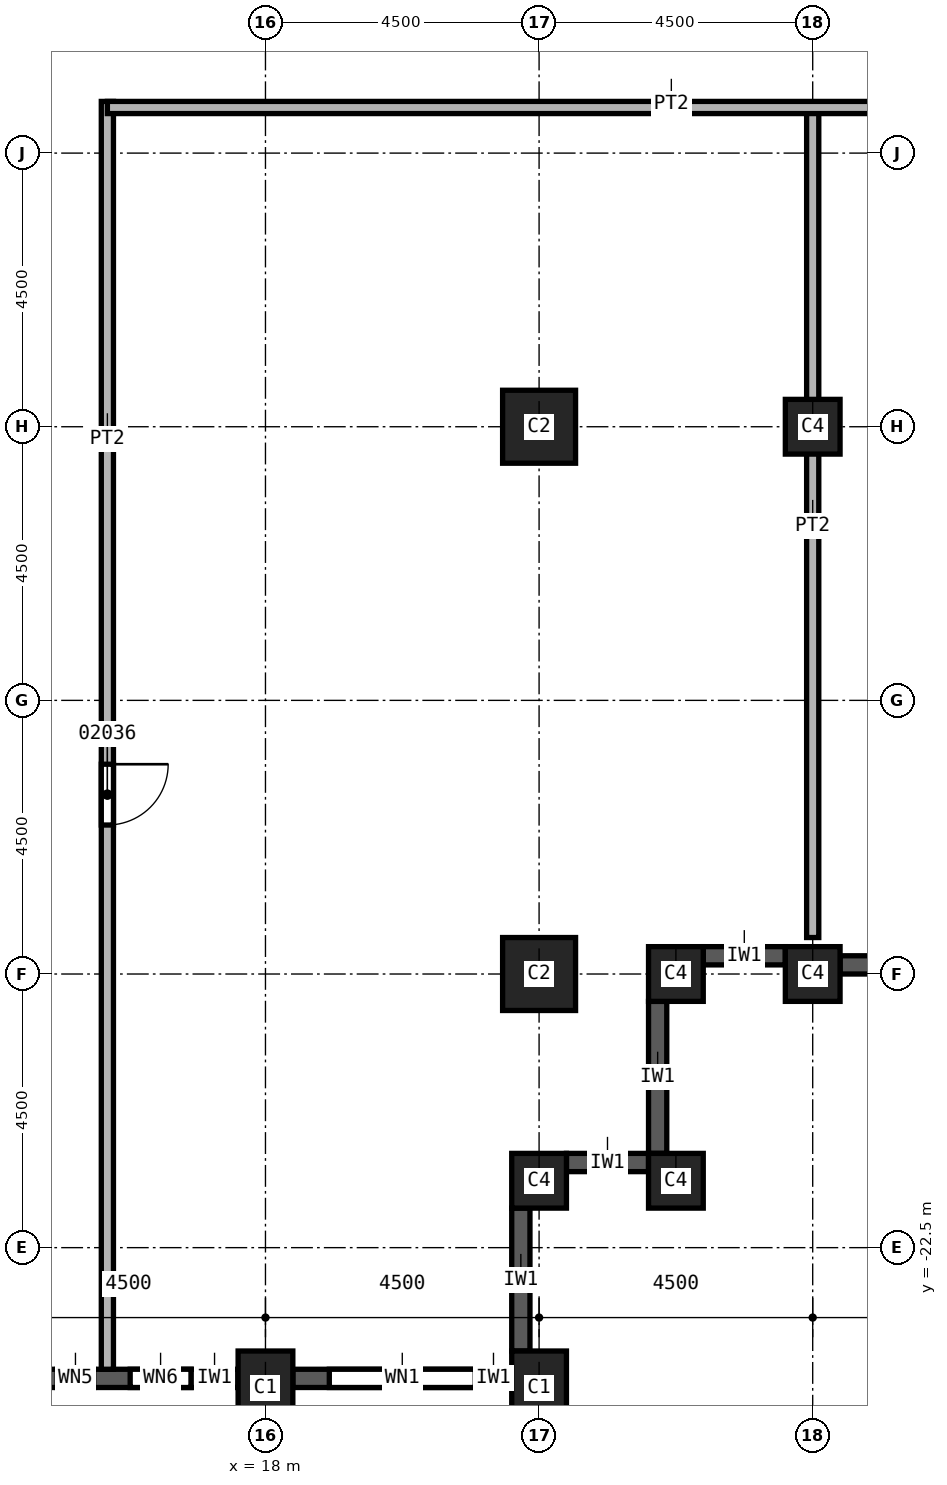
"""IFC4 building model, lengths in metres.
Left out: names, types, materials, properties, quantities, classifications, styles, units other than length and angle.
Written with IfcOpenShell. Run it as: python <this file> out.ifc"""

import sys

from ifc_helpers import new_model, si_unit, direction, frame, frame_2d, origin, origin_2d, place, context, subcontext, project, spatial, rectangle, extrude, element, fill, save


model = new_model("IFC4")
c1 = context("Model", 3, precision=1e-05, world=origin(), true_north=direction((0.0, 1.0)))
c2 = subcontext(c1, "Body", "Model", "MODEL_VIEW")
j1 = project(units=[si_unit("LENGTHUNIT", "METRE"), si_unit("PLANEANGLEUNIT", "RADIAN")], contexts=[c1])
p1 = place(None, origin())
s1 = spatial("IfcSite", under=j1, at=p1, CompositionType="ELEMENT")
p2 = place(p1, origin())
s2 = spatial("IfcBuilding", under=s1, at=p2, CompositionType="ELEMENT")
p3 = place(p2, frame((0.0, 0.0, 80.0)))
s3 = spatial("IfcBuildingStorey", under=s2, at=p3, CompositionType="ELEMENT", Elevation=80.0)
for number, where, z_axis, x_axis in (
    (1, (22.5, -9.0, 0.0), (0.0, 0.0, 1.0), (1.0, 0.0, 0.0)),
    (2, (22.5, -18.0, 0.0), (0.0, 0.0, 1.0), (1.0, 0.0, 0.0)),
):
    element("IfcColumn", number, at=place(p3, frame(where, z_axis=z_axis, x_axis=x_axis)), inside=s3, PredefinedType="COLUMN", context=c2, shape_type="SweptSolid", body=[
        extrude(rectangle(XDim=1.2, YDim=1.2, at=origin_2d()), origin(), (0.0, 0.0, 1.0), 3.7),
    ])
for number, where, z_axis, x_axis in (
    (3, (27.0, -9.0, 0.0), (0.0, 0.0, 1.0), (1.0, 0.0, 0.0)),
    (4, (27.0, -18.0, 0.0), (0.0, 0.0, 1.0), (1.0, 0.0, 0.0)),
):
    element("IfcColumn", number, at=place(p3, frame(where, z_axis=z_axis, x_axis=x_axis)), inside=s3, PredefinedType="COLUMN", context=c2, shape_type="SweptSolid", body=[
        extrude(rectangle(XDim=0.9, YDim=0.9, at=origin_2d()), origin(), (0.0, 0.0, 1.0), 3.7),
    ])
for number, where, z_axis, x_axis in (
    (5, (18.0, -24.8, 0.0), (0.0, 0.0, 1.0), (1.0, 0.0, 0.0)),
    (6, (22.5, -24.8, 0.0), (0.0, 0.0, 1.0), (1.0, 0.0, 0.0)),
):
    element("IfcColumn", number, at=place(p3, frame(where, z_axis=z_axis, x_axis=x_axis)), inside=s3, PredefinedType="COLUMN", context=c2, shape_type="SweptSolid", body=[
        extrude(rectangle(XDim=0.9, YDim=1.2, at=origin_2d()), origin(), (0.0, 0.0, 1.0), 3.7),
    ])
for number, where, z_axis, x_axis in (
    (7, (22.5, -21.4, 0.0), (0.0, 0.0, 1.0), (1.0, 0.0, 0.0)),
    (8, (24.75, -21.4, 0.0), (0.0, 0.0, 1.0), (1.0, 0.0, 0.0)),
    (9, (24.75, -18.0, 0.0), (0.0, 0.0, 1.0), (1.0, 0.0, 0.0)),
):
    element("IfcColumn", number, at=place(p3, frame(where, z_axis=z_axis, x_axis=x_axis)), inside=s3, PredefinedType="COLUMN", context=c2, shape_type="SweptSolid", body=[
        extrude(rectangle(XDim=0.9, YDim=0.9, at=origin_2d()), origin(), (0.0, 0.0, 1.0), 3.7),
    ])
p4 = place(p3, frame((13.95, -24.65, 0.0), z_axis=(0.0, 0.0, 1.0), x_axis=(1.0, 0.0, 0.0)))
e10 = element("IfcWall", 10, at=p4, inside=s3, PredefinedType="SOLIDWALL", context=c2, shape_type="SweptSolid", body=[
    extrude(rectangle(XDim=3.6, YDim=0.3, at=frame_2d((1.8, 0.0))), origin(), (0.0, 0.0, 1.0), 3.1),
])
p5 = place(p4, frame((0.625, 0.0, 0.8)))
e11 = element("IfcOpeningElement", 11, at=p5, cuts=e10, PredefinedType="OPENING", context=c2, shape_type="SweptSolid", body=[
    extrude(rectangle(XDim=0.6, YDim=1.95, at=frame_2d((0.3, 0.975))), frame((0.0, 0.15, 0.0), z_axis=(0.0, -1.0, 0.0), x_axis=(1.0, 0.0, 0.0)), (0.0, 0.0, 1.0), 0.3),
])
p6 = place(p4, frame((1.825, 0.0, 0.8)))
e12 = element("IfcOpeningElement", 12, at=p6, cuts=e10, PredefinedType="OPENING", context=c2, shape_type="SweptSolid", body=[
    extrude(rectangle(XDim=1.0, YDim=1.95, at=frame_2d((0.5, 0.975))), frame((0.0, 0.15, 0.0), z_axis=(0.0, -1.0, 0.0), x_axis=(1.0, 0.0, 0.0)), (0.0, 0.0, 1.0), 0.3),
])
p7 = place(p3, frame((18.45, -24.65, 0.0), z_axis=(0.0, 0.0, 1.0), x_axis=(1.0, 0.0, 0.0)))
e13 = element("IfcWall", 13, at=p7, inside=s3, PredefinedType="SOLIDWALL", context=c2, shape_type="SweptSolid", body=[
    extrude(rectangle(XDim=3.6, YDim=0.3, at=frame_2d((1.8, 0.0))), origin(), (0.0, 0.0, 1.0), 3.1),
])
p8 = place(p7, frame((0.6, 0.0, 0.8)))
e14 = element("IfcOpeningElement", 14, at=p8, cuts=e13, PredefinedType="OPENING", context=c2, shape_type="SweptSolid", body=[
    extrude(rectangle(XDim=2.4, YDim=1.95, at=frame_2d((1.2, 0.975))), frame((0.0, 0.15, 0.0), z_axis=(0.0, -1.0, 0.0), x_axis=(1.0, 0.0, 0.0)), (0.0, 0.0, 1.0), 0.3),
])
p9 = place(p3, frame((22.2, -24.2, 0.0), z_axis=(0.0, 0.0, 1.0), x_axis=(0.0, 1.0, 0.0)))
e15 = element("IfcWall", 15, at=p9, inside=s3, PredefinedType="SOLIDWALL", context=c2, shape_type="SweptSolid", body=[
    extrude(rectangle(XDim=2.35, YDim=0.3, at=frame_2d((1.175, 0.0))), origin(), (0.0, 0.0, 1.0), 3.1),
])
p10 = place(p3, frame((22.95, -21.1, 0.0), z_axis=(0.0, 0.0, 1.0), x_axis=(1.0, 0.0, 0.0)))
e16 = element("IfcWall", 16, at=p10, inside=s3, PredefinedType="SOLIDWALL", context=c2, shape_type="SweptSolid", body=[
    extrude(rectangle(XDim=1.35, YDim=0.3, at=frame_2d((0.675, 0.0))), origin(), (0.0, 0.0, 1.0), 3.1),
])
p11 = place(p3, frame((24.45, -20.95, 0.0), z_axis=(0.0, 0.0, 1.0), x_axis=(0.0, 1.0, 0.0)))
e17 = element("IfcWall", 17, at=p11, inside=s3, PredefinedType="SOLIDWALL", context=c2, shape_type="SweptSolid", body=[
    extrude(rectangle(XDim=2.5, YDim=0.3, at=frame_2d((1.25, 0.0))), origin(), (0.0, 0.0, 1.0), 3.1),
])
p12 = place(p3, frame((25.2, -17.7, 0.0), z_axis=(0.0, 0.0, 1.0), x_axis=(1.0, 0.0, 0.0)))
e18 = element("IfcWall", 18, at=p12, inside=s3, PredefinedType="SOLIDWALL", context=c2, shape_type="SweptSolid", body=[
    extrude(rectangle(XDim=1.35, YDim=0.3, at=frame_2d((0.675, 0.0))), origin(), (0.0, 0.0, 1.0), 3.1),
])
p13 = place(p3, frame((27.45, -17.85, 0.0), z_axis=(0.0, 0.0, 1.0), x_axis=(1.0, 0.0, 0.0)))
e19 = element("IfcWall", 19, at=p13, inside=s3, PredefinedType="SOLIDWALL", context=c2, shape_type="SweptSolid", body=[
    extrude(rectangle(XDim=3.6, YDim=0.3, at=frame_2d((1.8, 0.0))), origin(), (0.0, 0.0, 1.0), 3.1),
])
p14 = place(p13, frame((0.6, 0.0, 0.8)))
e20 = element("IfcOpeningElement", 20, at=p14, cuts=e19, PredefinedType="OPENING", context=c2, shape_type="SweptSolid", body=[
    extrude(rectangle(XDim=2.4, YDim=1.95, at=frame_2d((1.2, 0.975))), frame((0.0, 0.15, 0.0), z_axis=(0.0, -1.0, 0.0), x_axis=(1.0, 0.0, 0.0)), (0.0, 0.0, 1.0), 0.3),
])
p15 = place(p3, frame((15.4, -3.65, 0.0), z_axis=(0.0, 0.0, 1.0), x_axis=(0.0, -1.0, 0.0)))
e21 = element("IfcWall", 21, at=p15, inside=s3, PredefinedType="PARTITIONING", context=c2, shape_type="SweptSolid", body=[
    extrude(rectangle(XDim=20.85, YDim=0.2, at=frame_2d((10.425, 0.0))), origin(), (0.0, 0.0, 1.0), 3.7),
])
p16 = place(p15, frame((10.9, 0.0, 0.0)))
e22 = element("IfcOpeningElement", 22, at=p16, cuts=e21, PredefinedType="OPENING", context=c2, shape_type="SweptSolid", body=[
    extrude(rectangle(XDim=1.0, YDim=2.1, at=frame_2d((0.5, 1.05))), frame((0.0, 0.1, 0.0), z_axis=(0.0, -1.0, 0.0), x_axis=(1.0, 0.0, 0.0)), (0.0, 0.0, 1.0), 0.2),
])
p17 = place(p3, frame((27.0, -3.75, 0.0), z_axis=(0.0, 0.0, 1.0), x_axis=(0.0, -1.0, 0.0)))
e23 = element("IfcWall", 23, at=p17, inside=s3, PredefinedType="PARTITIONING", context=c2, shape_type="SweptSolid", body=[
    extrude(rectangle(XDim=13.65, YDim=0.2, at=frame_2d((6.825, 0.0))), origin(), (0.0, 0.0, 1.0), 3.7),
])
p18 = place(p3, frame((33.85, -3.75, 0.0), z_axis=(0.0, 0.0, 1.0), x_axis=(-1.0, 0.0, 0.0)))
e24 = element("IfcWall", 24, at=p18, inside=s3, PredefinedType="PARTITIONING", context=c2, shape_type="SweptSolid", body=[
    extrude(rectangle(XDim=18.45, YDim=0.2, at=frame_2d((9.225, 0.0))), origin(), (0.0, 0.0, 1.0), 3.7),
])
p19 = place(p8, origin())
e25 = element("IfcWindow", 25, at=p19, inside=s3, PartitioningType="SINGLE_PANEL", PredefinedType="WINDOW", context=c2, shape_type="SweptSolid", body=[
    extrude(rectangle(XDim=2.4, YDim=1.95, at=frame_2d((1.2, 0.975))), frame((0.0, 0.03, 0.0), z_axis=(0.0, -1.0, 0.0), x_axis=(1.0, 0.0, 0.0)), (0.0, 0.0, 1.0), 0.06),
])
fill(e14, e25)
p20 = place(p16, origin())
e26 = element("IfcDoor", 26, at=p20, inside=s3, OperationType="SINGLE_SWING_LEFT", PredefinedType="DOOR", context=c2, shape_type="SweptSolid", body=[
    extrude(rectangle(XDim=1.0, YDim=2.1, at=frame_2d((0.5, 1.05))), frame((0.0, 0.025, 0.0), z_axis=(0.0, -1.0, 0.0), x_axis=(1.0, 0.0, 0.0)), (0.0, 0.0, 1.0), 0.05),
])
fill(e22, e26)
p21 = place(p5, origin())
e27 = element("IfcWindow", 27, at=p21, inside=s3, PartitioningType="SINGLE_PANEL", PredefinedType="WINDOW", context=c2, shape_type="SweptSolid", body=[
    extrude(rectangle(XDim=0.6, YDim=1.95, at=frame_2d((0.3, 0.975))), frame((0.0, 0.03, 0.0), z_axis=(0.0, -1.0, 0.0), x_axis=(1.0, 0.0, 0.0)), (0.0, 0.0, 1.0), 0.06),
])
fill(e11, e27)
p22 = place(p6, origin())
e28 = element("IfcWindow", 28, at=p22, inside=s3, PartitioningType="SINGLE_PANEL", PredefinedType="WINDOW", context=c2, shape_type="SweptSolid", body=[
    extrude(rectangle(XDim=1.0, YDim=1.95, at=frame_2d((0.5, 0.975))), frame((0.0, 0.03, 0.0), z_axis=(0.0, -1.0, 0.0), x_axis=(1.0, 0.0, 0.0)), (0.0, 0.0, 1.0), 0.06),
])
fill(e12, e28)
save(model, sys.argv[1])
